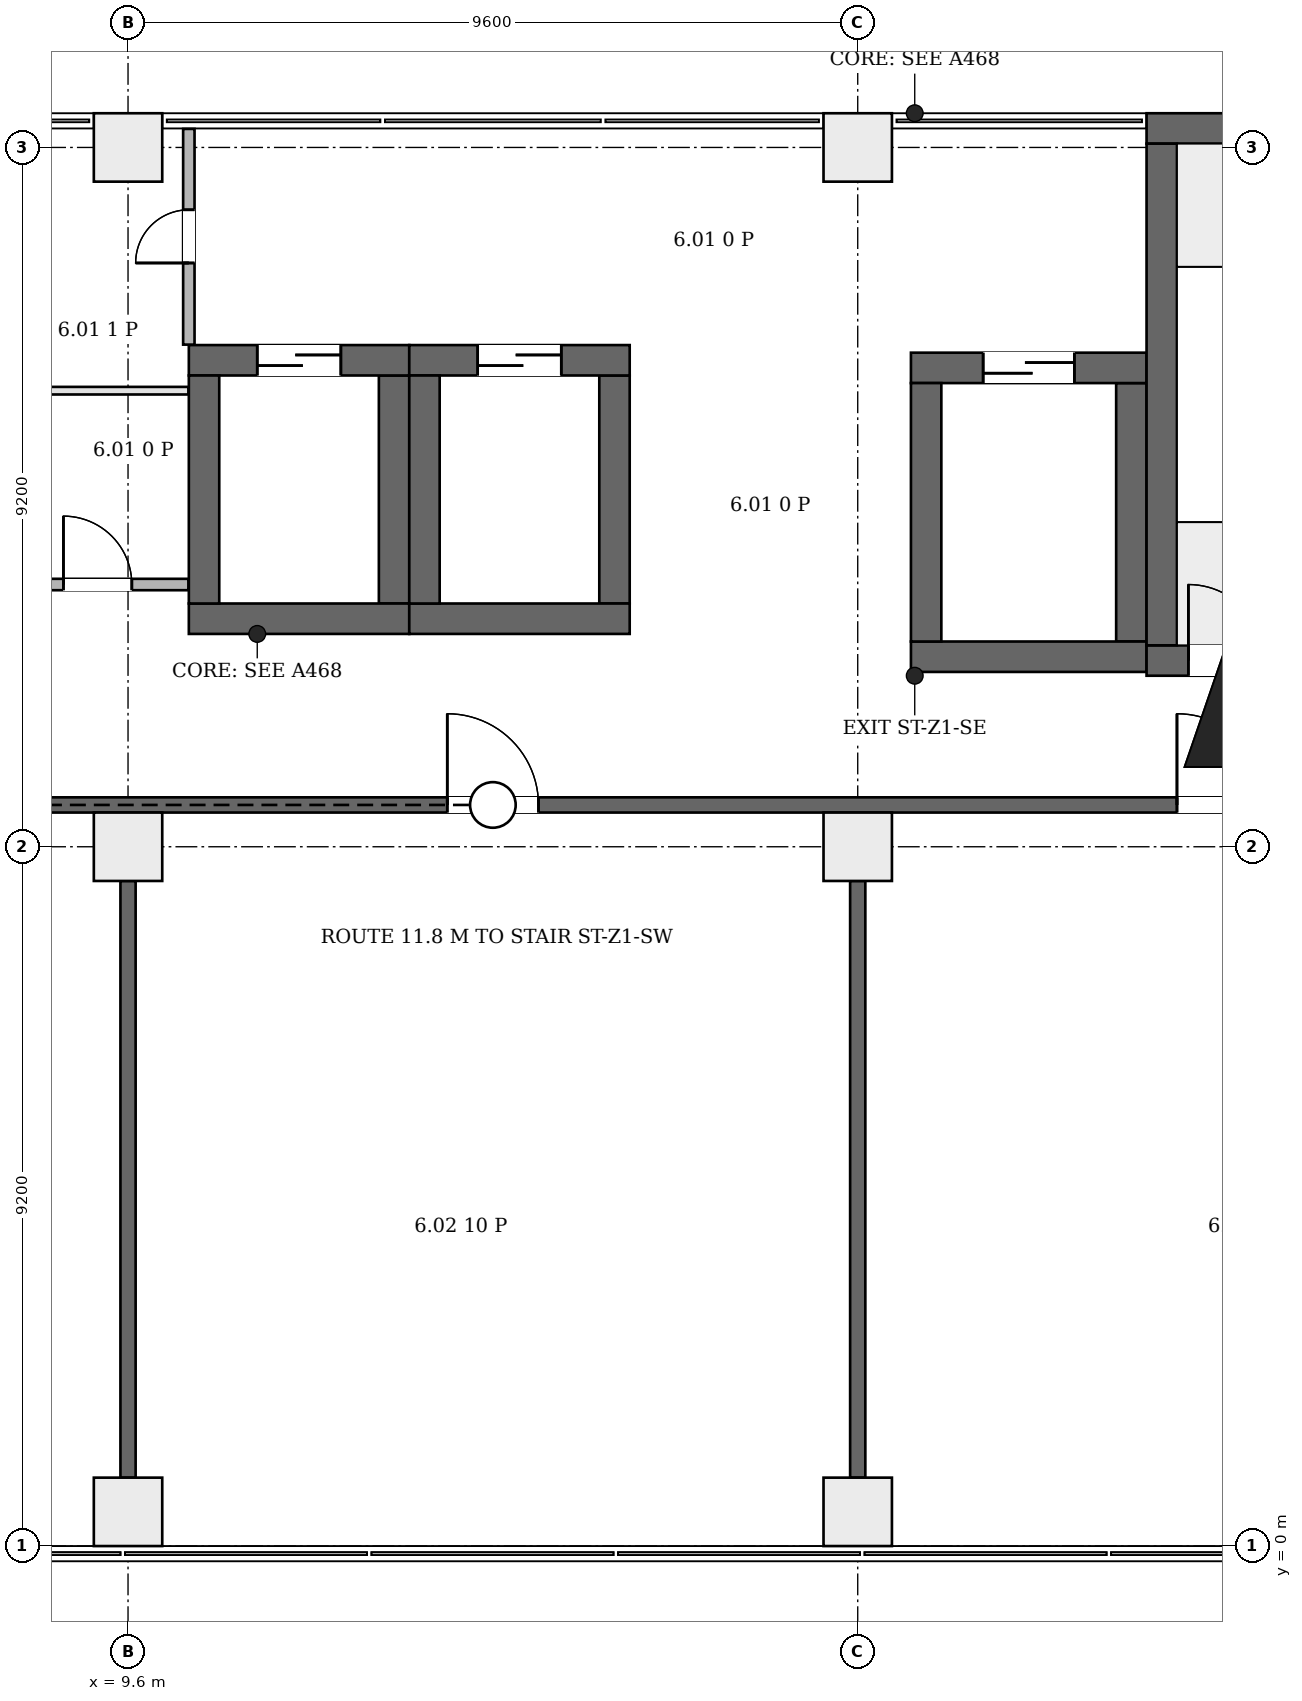
"""IFC4 building model, lengths in metres.
Left out: names, types, materials, properties, quantities, classifications, styles, units other than length and angle.
Written with IfcOpenShell. Run it as: python <this file> out.ifc"""

import sys

from ifc_helpers import new_model, si_unit, direction, frame, frame_2d, origin, origin_2d, place, context, subcontext, project, spatial, rectangle, extrude, element, fill, save


model = new_model("IFC4")
c1 = context("Model", 3, precision=1e-05, world=origin(), true_north=direction((0.0, 1.0)))
c2 = subcontext(c1, "Body", "Model", "MODEL_VIEW")
j1 = project(units=[si_unit("LENGTHUNIT", "METRE"), si_unit("PLANEANGLEUNIT", "RADIAN")], contexts=[c1])
p1 = place(None, origin())
s1 = spatial("IfcSite", under=j1, at=p1, CompositionType="ELEMENT")
p2 = place(p1, origin())
s2 = spatial("IfcBuilding", under=s1, at=p2, CompositionType="ELEMENT")
p3 = place(p2, frame((0.0, 0.0, 36.1)))
s3 = spatial("IfcBuildingStorey", under=s2, at=p3, CompositionType="ELEMENT", Elevation=36.1)
p4 = place(p3, frame((23.0, 11.65, 0.0), z_axis=(0.0, 0.0, 1.0), x_axis=(1.0, 0.0, 0.0)))
e1 = element("IfcWall", 1, at=p4, inside=s3, PredefinedType="SHEAR", context=c2, shape_type="SweptSolid", body=[
    extrude(rectangle(XDim=4.2, YDim=0.4, at=frame_2d((2.1, 0.0))), origin(), (0.0, 0.0, 1.0), 4.2),
])
p5 = place(p4, frame((0.55, 0.0, 0.0)))
e2 = element("IfcOpeningElement", 2, at=p5, cuts=e1, PredefinedType="OPENING", context=c2, shape_type="SweptSolid", body=[
    extrude(rectangle(XDim=1.0, YDim=2.1, at=frame_2d((0.5, 1.05))), frame((0.0, 0.21, 0.0), z_axis=(0.0, -1.0, 0.0), x_axis=(1.0, 0.0, 0.0)), (0.0, 0.0, 1.0), 0.42),
])
p6 = place(p4, frame((2.65, 0.0, 0.0)))
e3 = element("IfcOpeningElement", 3, at=p6, cuts=e1, PredefinedType="OPENING", context=c2, shape_type="SweptSolid", body=[
    extrude(rectangle(XDim=1.0, YDim=2.1, at=frame_2d((0.5, 1.05))), frame((0.0, 0.21, 0.0), z_axis=(0.0, -1.0, 0.0), x_axis=(1.0, 0.0, 0.0)), (0.0, 0.0, 1.0), 0.42),
])
p7 = place(p3, frame((23.0, 18.65, 0.0), z_axis=(0.0, 0.0, 1.0), x_axis=(1.0, 0.0, 0.0)))
e4 = element("IfcWall", 4, at=p7, inside=s3, PredefinedType="SHEAR", context=c2, shape_type="SweptSolid", body=[
    extrude(rectangle(XDim=4.2, YDim=0.4, at=frame_2d((2.1, 0.0))), origin(), (0.0, 0.0, 1.0), 4.2),
])
p8 = place(p3, frame((23.2, 11.85, 0.0), z_axis=(0.0, 0.0, 1.0), x_axis=(0.0, 1.0, 0.0)))
e5 = element("IfcWall", 5, at=p8, inside=s3, PredefinedType="SHEAR", context=c2, shape_type="SweptSolid", body=[
    extrude(rectangle(XDim=6.6, YDim=0.4, at=frame_2d((3.3, 0.0))), origin(), (0.0, 0.0, 1.0), 4.2),
])
p9 = place(p3, frame((10.4, 12.2, 0.0), z_axis=(0.0, 0.0, 1.0), x_axis=(1.0, 0.0, 0.0)))
e6 = element("IfcWall", 6, at=p9, inside=s3, PredefinedType="SHEAR", context=c2, shape_type="SweptSolid", body=[
    extrude(rectangle(XDim=2.9, YDim=0.4, at=frame_2d((1.45, 0.0))), origin(), (0.0, 0.0, 1.0), 4.2),
])
p10 = place(p3, frame((10.4, 15.6, 0.0), z_axis=(0.0, 0.0, 1.0), x_axis=(1.0, 0.0, 0.0)))
e7 = element("IfcWall", 7, at=p10, inside=s3, PredefinedType="SHEAR", context=c2, shape_type="SweptSolid", body=[
    extrude(rectangle(XDim=2.9, YDim=0.4, at=frame_2d((1.45, 0.0))), origin(), (0.0, 0.0, 1.0), 4.2),
])
p11 = place(p10, frame((0.9, 0.0, 0.0)))
e8 = element("IfcOpeningElement", 8, at=p11, cuts=e7, PredefinedType="OPENING", context=c2, shape_type="SweptSolid", body=[
    extrude(rectangle(XDim=1.1, YDim=2.1, at=frame_2d((0.55, 1.05))), frame((0.0, 0.21, 0.0), z_axis=(0.0, -1.0, 0.0), x_axis=(1.0, 0.0, 0.0)), (0.0, 0.0, 1.0), 0.42),
])
for number, where, z_axis, x_axis in (
    (9, (10.6, 12.4, 0.0), (0.0, 0.0, 1.0), (0.0, 1.0, 0.0)),
    (10, (13.1, 12.4, 0.0), (0.0, 0.0, 1.0), (0.0, 1.0, 0.0)),
):
    element("IfcWall", number, at=place(p3, frame(where, z_axis=z_axis, x_axis=x_axis)), inside=s3, PredefinedType="SHEAR", context=c2, shape_type="SweptSolid", body=[
        extrude(rectangle(XDim=3.0, YDim=0.4, at=frame_2d((1.5, 0.0))), origin(), (0.0, 0.0, 1.0), 4.2),
    ])
p12 = place(p3, frame((13.3, 12.2, 0.0), z_axis=(0.0, 0.0, 1.0), x_axis=(1.0, 0.0, 0.0)))
e11 = element("IfcWall", 11, at=p12, inside=s3, PredefinedType="SHEAR", context=c2, shape_type="SweptSolid", body=[
    extrude(rectangle(XDim=2.9, YDim=0.4, at=frame_2d((1.45, 0.0))), origin(), (0.0, 0.0, 1.0), 4.2),
])
p13 = place(p3, frame((13.3, 15.6, 0.0), z_axis=(0.0, 0.0, 1.0), x_axis=(1.0, 0.0, 0.0)))
e12 = element("IfcWall", 12, at=p13, inside=s3, PredefinedType="SHEAR", context=c2, shape_type="SweptSolid", body=[
    extrude(rectangle(XDim=2.9, YDim=0.4, at=frame_2d((1.45, 0.0))), origin(), (0.0, 0.0, 1.0), 4.2),
])
p14 = place(p13, frame((0.9, 0.0, 0.0)))
e13 = element("IfcOpeningElement", 13, at=p14, cuts=e12, PredefinedType="OPENING", context=c2, shape_type="SweptSolid", body=[
    extrude(rectangle(XDim=1.1, YDim=2.1, at=frame_2d((0.55, 1.05))), frame((0.0, 0.21, 0.0), z_axis=(0.0, -1.0, 0.0), x_axis=(1.0, 0.0, 0.0)), (0.0, 0.0, 1.0), 0.42),
])
for number, where, z_axis, x_axis in (
    (14, (13.5, 12.4, 0.0), (0.0, 0.0, 1.0), (0.0, 1.0, 0.0)),
    (15, (16.0, 12.4, 0.0), (0.0, 0.0, 1.0), (0.0, 1.0, 0.0)),
):
    element("IfcWall", number, at=place(p3, frame(where, z_axis=z_axis, x_axis=x_axis)), inside=s3, PredefinedType="SHEAR", context=c2, shape_type="SweptSolid", body=[
        extrude(rectangle(XDim=3.0, YDim=0.4, at=frame_2d((1.5, 0.0))), origin(), (0.0, 0.0, 1.0), 4.2),
    ])
p15 = place(p3, frame((19.9, 11.7, 0.0), z_axis=(0.0, 0.0, 1.0), x_axis=(1.0, 0.0, 0.0)))
e16 = element("IfcWall", 16, at=p15, inside=s3, PredefinedType="SHEAR", context=c2, shape_type="SweptSolid", body=[
    extrude(rectangle(XDim=3.1, YDim=0.4, at=frame_2d((1.55, 0.0))), origin(), (0.0, 0.0, 1.0), 4.2),
])
p16 = place(p3, frame((19.9, 15.5, 0.0), z_axis=(0.0, 0.0, 1.0), x_axis=(1.0, 0.0, 0.0)))
e17 = element("IfcWall", 17, at=p16, inside=s3, PredefinedType="SHEAR", context=c2, shape_type="SweptSolid", body=[
    extrude(rectangle(XDim=3.1, YDim=0.4, at=frame_2d((1.55, 0.0))), origin(), (0.0, 0.0, 1.0), 4.2),
])
p17 = place(p16, frame((0.95, 0.0, 0.0)))
e18 = element("IfcOpeningElement", 18, at=p17, cuts=e17, PredefinedType="OPENING", context=c2, shape_type="SweptSolid", body=[
    extrude(rectangle(XDim=1.2, YDim=2.1, at=frame_2d((0.6, 1.05))), frame((0.0, 0.21, 0.0), z_axis=(0.0, -1.0, 0.0), x_axis=(1.0, 0.0, 0.0)), (0.0, 0.0, 1.0), 0.42),
])
for number, where, z_axis, x_axis in (
    (19, (20.1, 11.9, 0.0), (0.0, 0.0, 1.0), (0.0, 1.0, 0.0)),
    (20, (22.8, 11.9, 0.0), (0.0, 0.0, 1.0), (0.0, 1.0, 0.0)),
):
    element("IfcWall", number, at=place(p3, frame(where, z_axis=z_axis, x_axis=x_axis)), inside=s3, PredefinedType="SHEAR", context=c2, shape_type="SweptSolid", body=[
        extrude(rectangle(XDim=3.4, YDim=0.4, at=frame_2d((1.7, 0.0))), origin(), (0.0, 0.0, 1.0), 4.2),
    ])
for number, where, z_axis, x_axis in (
    (21, (9.6, 0.45, 0.0), (0.0, 0.0, 1.0), (1.0, 0.0, 0.0)),
    (22, (19.2, 0.45, 0.0), (0.0, 0.0, 1.0), (1.0, 0.0, 0.0)),
    (23, (9.6, 9.2, 0.0), (0.0, 0.0, 1.0), (1.0, 0.0, 0.0)),
    (24, (19.2, 9.2, 0.0), (0.0, 0.0, 1.0), (1.0, 0.0, 0.0)),
    (25, (9.6, 18.4, 0.0), (0.0, 0.0, 1.0), (1.0, 0.0, 0.0)),
    (26, (19.2, 18.4, 0.0), (0.0, 0.0, 1.0), (1.0, 0.0, 0.0)),
):
    element("IfcColumn", number, at=place(p3, frame(where, z_axis=z_axis, x_axis=x_axis)), inside=s3, PredefinedType="COLUMN", context=c2, shape_type="SweptSolid", body=[
        extrude(rectangle(XDim=0.9, YDim=0.9, at=origin_2d()), origin(), (0.0, 0.0, 1.0), 4.2),
    ])
p18 = place(p3, frame((4.3, 9.75, 0.0), z_axis=(0.0, 0.0, 1.0), x_axis=(1.0, 0.0, 0.0)))
e27 = element("IfcWall", 27, at=p18, inside=s3, PredefinedType="PARTITIONING", context=c2, shape_type="SweptSolid", body=[
    extrude(rectangle(XDim=43.894, YDim=0.2, at=frame_2d((21.947, 0.0))), origin(), (0.0, 0.0, 1.0), 3.9),
])
p19 = place(p18, frame((2.1, 0.0, 0.0)))
e28 = element("IfcOpeningElement", 28, at=p19, cuts=e27, PredefinedType="OPENING", context=c2, shape_type="SweptSolid", body=[
    extrude(rectangle(XDim=1.2, YDim=2.1, at=frame_2d((0.6, 1.05))), frame((0.0, 0.11, 0.0), z_axis=(0.0, -1.0, 0.0), x_axis=(1.0, 0.0, 0.0)), (0.0, 0.0, 1.0), 0.22),
])
p20 = place(p18, frame((9.5, 0.0, 0.0)))
e29 = element("IfcOpeningElement", 29, at=p20, cuts=e27, PredefinedType="OPENING", context=c2, shape_type="SweptSolid", body=[
    extrude(rectangle(XDim=1.2, YDim=2.1, at=frame_2d((0.6, 1.05))), frame((0.0, 0.11, 0.0), z_axis=(0.0, -1.0, 0.0), x_axis=(1.0, 0.0, 0.0)), (0.0, 0.0, 1.0), 0.22),
])
p21 = place(p18, frame((19.1, 0.0, 0.0)))
e30 = element("IfcOpeningElement", 30, at=p21, cuts=e27, PredefinedType="OPENING", context=c2, shape_type="SweptSolid", body=[
    extrude(rectangle(XDim=1.2, YDim=2.1, at=frame_2d((0.6, 1.05))), frame((0.0, 0.11, 0.0), z_axis=(0.0, -1.0, 0.0), x_axis=(1.0, 0.0, 0.0)), (0.0, 0.0, 1.0), 0.22),
])
p22 = place(p18, frame((28.7, 0.0, 0.0)))
e31 = element("IfcOpeningElement", 31, at=p22, cuts=e27, PredefinedType="OPENING", context=c2, shape_type="SweptSolid", body=[
    extrude(rectangle(XDim=1.2, YDim=2.1, at=frame_2d((0.6, 1.05))), frame((0.0, 0.11, 0.0), z_axis=(0.0, -1.0, 0.0), x_axis=(1.0, 0.0, 0.0)), (0.0, 0.0, 1.0), 0.22),
])
p23 = place(p18, frame((38.4, 0.0, 0.0)))
e32 = element("IfcOpeningElement", 32, at=p23, cuts=e27, PredefinedType="OPENING", context=c2, shape_type="SweptSolid", body=[
    extrude(rectangle(XDim=1.2, YDim=2.1, at=frame_2d((0.6, 1.05))), frame((0.0, 0.11, 0.0), z_axis=(0.0, -1.0, 0.0), x_axis=(1.0, 0.0, 0.0)), (0.0, 0.0, 1.0), 0.22),
])
p24 = place(p3, frame((6.125, 12.65, 0.0), z_axis=(0.0, 0.0, 1.0), x_axis=(1.0, 0.0, 0.0)))
e33 = element("IfcWall", 33, at=p24, inside=s3, PredefinedType="PARTITIONING", context=c2, shape_type="SweptSolid", body=[
    extrude(rectangle(XDim=4.269, YDim=0.15, at=frame_2d((2.135, 0.0))), origin(), (0.0, 0.0, 1.0), 3.9),
])
p25 = place(p24, frame((2.625, 0.0, 0.0)))
e34 = element("IfcOpeningElement", 34, at=p25, cuts=e33, PredefinedType="OPENING", context=c2, shape_type="SweptSolid", body=[
    extrude(rectangle(XDim=0.9, YDim=2.1, at=frame_2d((0.45, 1.05))), frame((0.0, 0.085, 0.0), z_axis=(0.0, -1.0, 0.0), x_axis=(1.0, 0.0, 0.0)), (0.0, 0.0, 1.0), 0.17),
])
p26 = place(p3, frame((6.275, 15.2, 0.0), z_axis=(0.0, 0.0, 1.0), x_axis=(1.0, 0.0, 0.0)))
e35 = element("IfcWall", 35, at=p26, inside=s3, PredefinedType="PARTITIONING", context=c2, shape_type="SweptSolid", body=[
    extrude(rectangle(XDim=4.119, YDim=0.1, at=frame_2d((2.06, 0.0))), origin(), (0.0, 0.0, 1.0), 3.9),
])
p27 = place(p3, frame((9.6, 0.9, 0.0), z_axis=(0.0, 0.0, 1.0), x_axis=(0.0, 1.0, 0.0)))
e36 = element("IfcWall", 36, at=p27, inside=s3, PredefinedType="PARTITIONING", context=c2, shape_type="SweptSolid", body=[
    extrude(rectangle(XDim=7.85, YDim=0.2, at=frame_2d((3.925, 0.0))), origin(), (0.0, 0.0, 1.0), 3.9),
])
p28 = place(p3, frame((10.4, 15.806, 0.0), z_axis=(0.0, 0.0, 1.0), x_axis=(0.0, 1.0, 0.0)))
e37 = element("IfcWall", 37, at=p28, inside=s3, PredefinedType="PARTITIONING", context=c2, shape_type="SweptSolid", body=[
    extrude(rectangle(XDim=2.838, YDim=0.15, at=frame_2d((1.419, 0.0))), origin(), (0.0, 0.0, 1.0), 3.9),
])
p29 = place(p28, frame((1.074, 0.0, 0.0)))
e38 = element("IfcOpeningElement", 38, at=p29, cuts=e37, PredefinedType="OPENING", context=c2, shape_type="SweptSolid", body=[
    extrude(rectangle(XDim=0.7, YDim=2.1, at=frame_2d((0.35, 1.05))), frame((0.0, 0.085, 0.0), z_axis=(0.0, -1.0, 0.0), x_axis=(1.0, 0.0, 0.0)), (0.0, 0.0, 1.0), 0.17),
])
p30 = place(p3, frame((19.2, 0.9, 0.0), z_axis=(0.0, 0.0, 1.0), x_axis=(0.0, 1.0, 0.0)))
e39 = element("IfcWall", 39, at=p30, inside=s3, PredefinedType="PARTITIONING", context=c2, shape_type="SweptSolid", body=[
    extrude(rectangle(XDim=7.85, YDim=0.2, at=frame_2d((3.925, 0.0))), origin(), (0.0, 0.0, 1.0), 3.9),
])
p31 = place(p5, origin())
e40 = element("IfcDoor", 40, at=p31, inside=s3, OperationType="SINGLE_SWING_RIGHT", PredefinedType="DOOR", context=c2, shape_type="SweptSolid", body=[
    extrude(rectangle(XDim=1.0, YDim=2.1, at=frame_2d((0.5, 1.05))), frame((0.0, 0.025, 0.0), z_axis=(0.0, -1.0, 0.0), x_axis=(1.0, 0.0, 0.0)), (0.0, 0.0, 1.0), 0.05),
])
fill(e2, e40)
p32 = place(p11, origin())
e41 = element("IfcDoor", 41, at=p32, inside=s3, OperationType="DOUBLE_DOOR_SLIDING", PredefinedType="DOOR", context=c2, shape_type="SweptSolid", body=[
    extrude(rectangle(XDim=1.1, YDim=2.1, at=frame_2d((0.55, 1.05))), frame((0.0, 0.025, 0.0), z_axis=(0.0, -1.0, 0.0), x_axis=(1.0, 0.0, 0.0)), (0.0, 0.0, 1.0), 0.05),
])
fill(e8, e41)
p33 = place(p14, origin())
e42 = element("IfcDoor", 42, at=p33, inside=s3, OperationType="DOUBLE_DOOR_SLIDING", PredefinedType="DOOR", context=c2, shape_type="SweptSolid", body=[
    extrude(rectangle(XDim=1.1, YDim=2.1, at=frame_2d((0.55, 1.05))), frame((0.0, 0.025, 0.0), z_axis=(0.0, -1.0, 0.0), x_axis=(1.0, 0.0, 0.0)), (0.0, 0.0, 1.0), 0.05),
])
fill(e13, e42)
p34 = place(p17, origin())
e43 = element("IfcDoor", 43, at=p34, inside=s3, OperationType="DOUBLE_DOOR_SLIDING", PredefinedType="DOOR", context=c2, shape_type="SweptSolid", body=[
    extrude(rectangle(XDim=1.2, YDim=2.1, at=frame_2d((0.6, 1.05))), frame((0.0, 0.025, 0.0), z_axis=(0.0, -1.0, 0.0), x_axis=(1.0, 0.0, 0.0)), (0.0, 0.0, 1.0), 0.05),
])
fill(e18, e43)
p35 = place(p25, origin())
e44 = element("IfcDoor", 44, at=p35, inside=s3, OperationType="SINGLE_SWING_RIGHT", PredefinedType="DOOR", context=c2, shape_type="SweptSolid", body=[
    extrude(rectangle(XDim=0.9, YDim=2.1, at=frame_2d((0.45, 1.05))), frame((0.0, 0.025, 0.0), z_axis=(0.0, -1.0, 0.0), x_axis=(1.0, 0.0, 0.0)), (0.0, 0.0, 1.0), 0.05),
])
fill(e34, e44)
p36 = place(p29, origin())
e45 = element("IfcDoor", 45, at=p36, inside=s3, OperationType="SINGLE_SWING_LEFT", PredefinedType="DOOR", context=c2, shape_type="SweptSolid", body=[
    extrude(rectangle(XDim=0.7, YDim=2.1, at=frame_2d((0.35, 1.05))), frame((0.0, 0.025, 0.0), z_axis=(0.0, -1.0, 0.0), x_axis=(1.0, 0.0, 0.0)), (0.0, 0.0, 1.0), 0.05),
])
fill(e38, e45)
p37 = place(p20, origin())
e46 = element("IfcDoor", 46, at=p37, inside=s3, OperationType="SINGLE_SWING_RIGHT", PredefinedType="DOOR", context=c2, shape_type="SweptSolid", body=[
    extrude(rectangle(XDim=1.2, YDim=2.1, at=frame_2d((0.6, 1.05))), frame((0.0, 0.025, 0.0), z_axis=(0.0, -1.0, 0.0), x_axis=(1.0, 0.0, 0.0)), (0.0, 0.0, 1.0), 0.05),
])
fill(e29, e46)
p38 = place(p21, origin())
e47 = element("IfcDoor", 47, at=p38, inside=s3, OperationType="SINGLE_SWING_LEFT", PredefinedType="DOOR", context=c2, shape_type="SweptSolid", body=[
    extrude(rectangle(XDim=1.2, YDim=2.1, at=frame_2d((0.6, 1.05))), frame((0.0, 0.025, 0.0), z_axis=(0.0, -1.0, 0.0), x_axis=(1.0, 0.0, 0.0)), (0.0, 0.0, 1.0), 0.05),
])
fill(e30, e47)
save(model, sys.argv[1])
